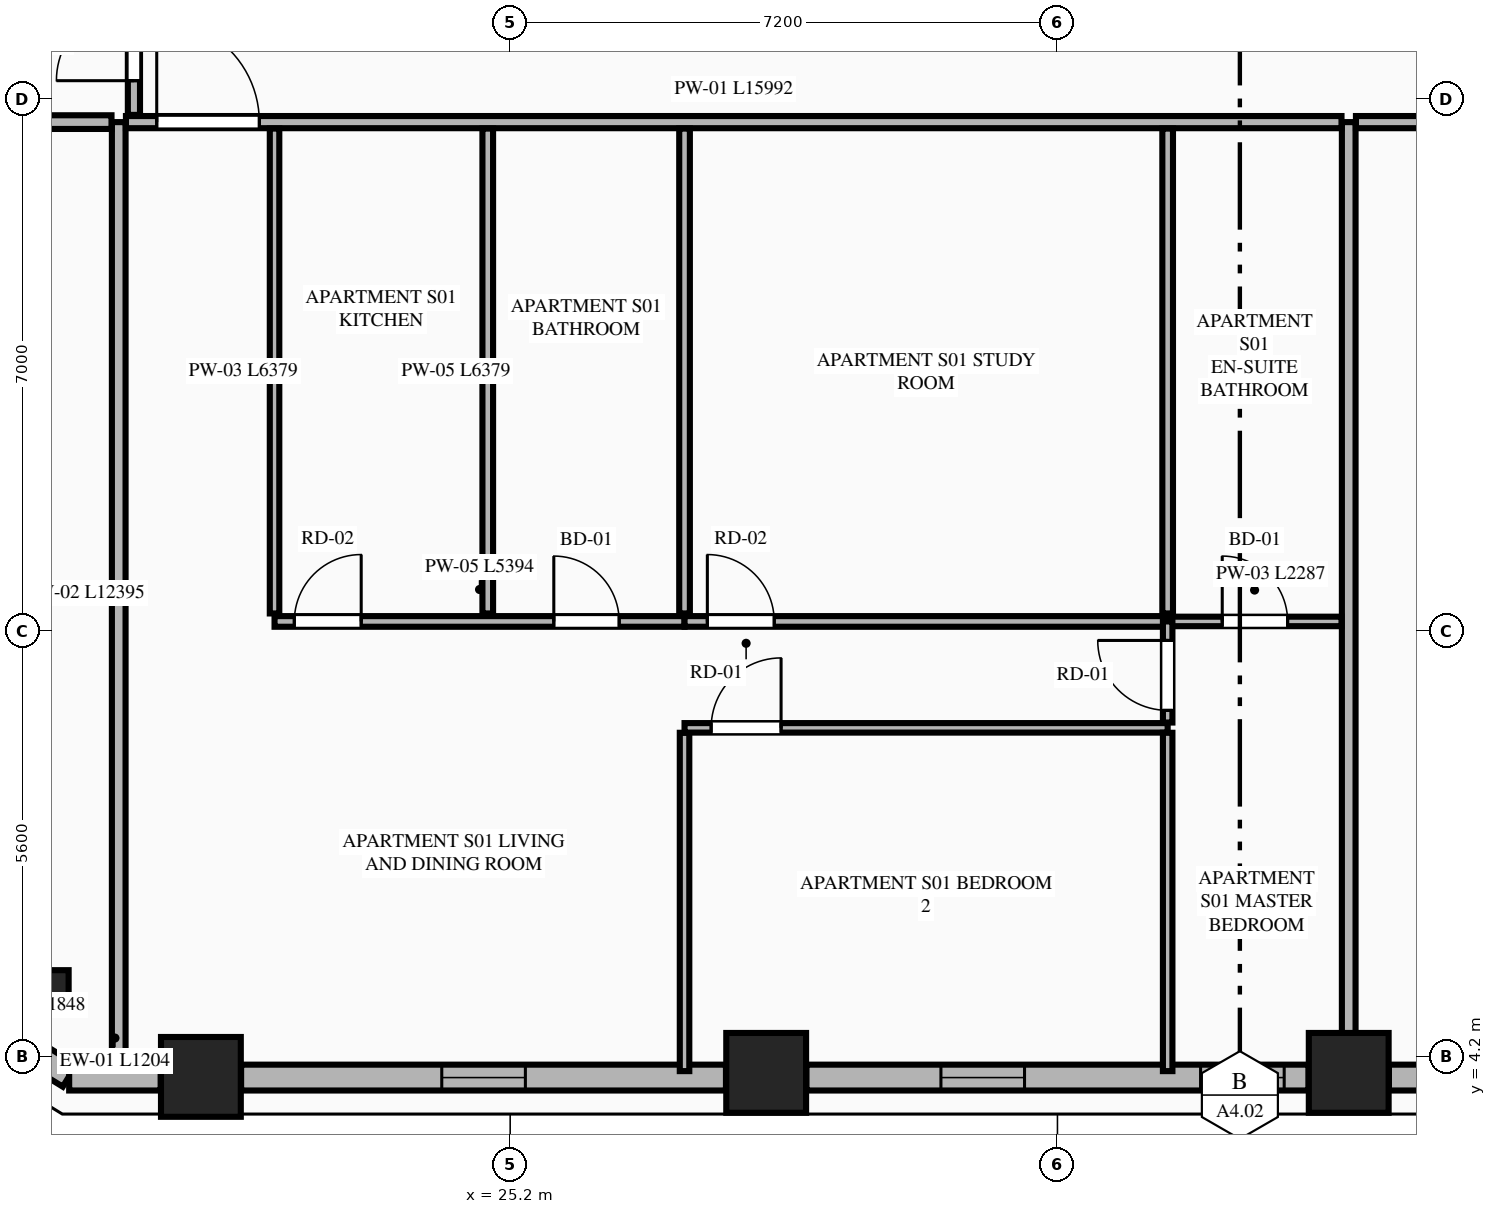
"""IFC4 building model, lengths in metres.
Left out: names, types, materials, properties, quantities, classifications, styles, units other than length and angle.
Written with IfcOpenShell. Run it as: python <this file> out.ifc"""

import sys

from ifc_helpers import new_model, si_unit, direction, frame, frame_2d, origin, origin_2d, place, context, subcontext, project, spatial, rectangle, extrude, element, fill, save


model = new_model("IFC4")
c1 = context("Model", 3, precision=1e-05, world=origin(), true_north=direction((0.0, 1.0)))
c2 = subcontext(c1, "Body", "Model", "MODEL_VIEW")
j1 = project(units=[si_unit("LENGTHUNIT", "METRE"), si_unit("PLANEANGLEUNIT", "RADIAN")], contexts=[c1])
p1 = place(None, origin())
s1 = spatial("IfcSite", under=j1, at=p1, CompositionType="ELEMENT")
p2 = place(p1, origin())
s2 = spatial("IfcBuilding", under=s1, at=p2, CompositionType="ELEMENT")
p3 = place(p2, frame((0.0, 0.0, 105.5)))
s3 = spatial("IfcBuildingStorey", under=s2, at=p3, CompositionType="ELEMENT", Elevation=105.5)
for number, where, z_axis, x_axis in (
    (1, (21.131, 3.939, 0.0), (0.0, 0.0, 1.0), (1.0, 0.0, 0.0)),
    (2, (28.568, 3.992, 0.0), (0.0, 0.0, 1.0), (1.0, 0.0, 0.0)),
    (3, (36.232, 3.992, 0.0), (0.0, 0.0, 1.0), (1.0, 0.0, 0.0)),
):
    element("IfcColumn", number, at=place(p3, frame(where, z_axis=z_axis, x_axis=x_axis)), inside=s3, PredefinedType="COLUMN", context=c2, shape_type="SweptSolid", body=[
        extrude(rectangle(XDim=1.05, YDim=1.05, at=origin_2d()), origin(), (0.0, 0.0, 1.0), 3.55),
    ])
p4 = place(p3, frame((19.141, 5.093, 0.0), z_axis=(0.0, 0.0, 1.0), x_axis=(0.865160173452, -0.501495637342, 0.0)))
e4 = element("IfcColumn", 4, at=p4, inside=s3, PredefinedType="PILASTER", context=c2, shape_type="SweptSolid", body=[
    extrude(rectangle(XDim=0.5, YDim=0.35, at=origin_2d()), origin(), (0.0, 0.0, 1.0), 3.55),
])
p5 = place(p3, frame((17.829, 4.923, 0.0), z_axis=(0.0, 0.0, 1.0), x_axis=(0.851798915137, -0.523868884523, 0.0)))
e5 = element("IfcWall", 5, at=p5, inside=s3, PredefinedType="STANDARD", context=c2, shape_type="SweptSolid", body=[
    extrude(rectangle(XDim=1.848, YDim=0.34, at=frame_2d((0.924, 0.0))), origin(), (0.0, 0.0, 1.0), 3.34),
])
p6 = place(p3, frame((19.398, 3.93, 0.0), z_axis=(0.0, 0.0, 1.0), x_axis=(1.0, 0.0, 0.0)))
e6 = element("IfcWall", 6, at=p6, inside=s3, PredefinedType="STANDARD", context=c2, shape_type="SweptSolid", body=[
    extrude(rectangle(XDim=1.204, YDim=0.34, at=frame_2d((0.602, 0.0))), origin(), (0.0, 0.0, 1.0), 3.34),
])
p7 = place(p3, frame((21.66, 3.93, 0.0), z_axis=(0.0, 0.0, 1.0), x_axis=(1.0, 0.0, 0.0)))
e7 = element("IfcWall", 7, at=p7, inside=s3, PredefinedType="STANDARD", context=c2, shape_type="SweptSolid", body=[
    extrude(rectangle(XDim=6.379, YDim=0.34, at=frame_2d((3.189, 0.0))), origin(), (0.0, 0.0, 1.0), 2.797),
])
p8 = place(p7, frame((2.64, 0.0, 0.75)))
e8 = element("IfcOpeningElement", 8, at=p8, cuts=e7, PredefinedType="OPENING", context=c2, shape_type="SweptSolid", body=[
    extrude(rectangle(XDim=1.1, YDim=1.897, at=frame_2d((0.55, 0.948))), frame((0.0, 0.18, 0.0), z_axis=(0.0, -1.0, 0.0), x_axis=(1.0, 0.0, 0.0)), (0.0, 0.0, 1.0), 0.36),
])
p9 = place(p3, frame((29.097, 3.93, 0.0), z_axis=(0.0, 0.0, 1.0), x_axis=(1.0, 0.0, 0.0)))
e9 = element("IfcWall", 9, at=p9, inside=s3, PredefinedType="STANDARD", context=c2, shape_type="SweptSolid", body=[
    extrude(rectangle(XDim=6.606, YDim=0.34, at=frame_2d((3.303, 0.0))), origin(), (0.0, 0.0, 1.0), 2.797),
])
p10 = place(p9, frame((1.77, 0.0, 0.75)))
e10 = element("IfcOpeningElement", 10, at=p10, cuts=e9, PredefinedType="OPENING", context=c2, shape_type="SweptSolid", body=[
    extrude(rectangle(XDim=1.1, YDim=1.897, at=frame_2d((0.55, 0.948))), frame((0.0, 0.18, 0.0), z_axis=(0.0, -1.0, 0.0), x_axis=(1.0, 0.0, 0.0)), (0.0, 0.0, 1.0), 0.36),
])
p11 = place(p9, frame((5.186, 0.0, 0.75)))
e11 = element("IfcOpeningElement", 11, at=p11, cuts=e9, PredefinedType="OPENING", context=c2, shape_type="SweptSolid", body=[
    extrude(rectangle(XDim=1.1, YDim=1.897, at=frame_2d((0.55, 0.948))), frame((0.0, 0.18, 0.0), z_axis=(0.0, -1.0, 0.0), x_axis=(1.0, 0.0, 0.0)), (0.0, 0.0, 1.0), 0.36),
])
p12 = place(p3, frame((36.761, 3.93, 0.0), z_axis=(0.0, 0.0, 1.0), x_axis=(1.0, 0.0, 0.0)))
e12 = element("IfcWall", 12, at=p12, inside=s3, PredefinedType="STANDARD", context=c2, shape_type="SweptSolid", body=[
    extrude(rectangle(XDim=6.379, YDim=0.34, at=frame_2d((3.189, 0.0))), origin(), (0.0, 0.0, 1.0), 2.797),
])
p13 = place(p12, frame((2.639, 0.0, 0.75)))
e13 = element("IfcOpeningElement", 13, at=p13, cuts=e12, PredefinedType="OPENING", context=c2, shape_type="SweptSolid", body=[
    extrude(rectangle(XDim=1.1, YDim=1.897, at=frame_2d((0.55, 0.948))), frame((0.0, 0.18, 0.0), z_axis=(0.0, -1.0, 0.0), x_axis=(1.0, 0.0, 0.0)), (0.0, 0.0, 1.0), 0.36),
])
p14 = place(p3, frame((20.05, 4.105, 0.0), z_axis=(0.0, 0.0, 1.0), x_axis=(0.0, 1.0, 0.0)))
e14 = element("IfcWall", 14, at=p14, inside=s3, PredefinedType="PARTITIONING", context=c2, shape_type="SweptSolid", body=[
    extrude(rectangle(XDim=12.395, YDim=0.18, at=frame_2d((6.198, 0.0))), origin(), (0.0, 0.0, 1.0), 3.34),
])
p15 = place(p3, frame((36.232, 4.105, 0.0), z_axis=(0.0, 0.0, 1.0), x_axis=(0.0, 1.0, 0.0)))
e15 = element("IfcWall", 15, at=p15, inside=s3, PredefinedType="PARTITIONING", context=c2, shape_type="SweptSolid", body=[
    extrude(rectangle(XDim=12.395, YDim=0.18, at=frame_2d((6.198, 0.0))), origin(), (0.0, 0.0, 1.0), 2.722),
])
p16 = place(p3, frame((20.145, 16.5, 0.0), z_axis=(0.0, 0.0, 1.0), x_axis=(1.0, 0.0, 0.0)))
e16 = element("IfcWall", 16, at=p16, inside=s3, PredefinedType="PARTITIONING", context=c2, shape_type="SweptSolid", body=[
    extrude(rectangle(XDim=15.992, YDim=0.16, at=frame_2d((7.996, 0.0))), origin(), (0.0, 0.0, 1.0), 3.34),
])
p17 = place(p16, frame((0.405, 0.0, 0.0)))
e17 = element("IfcOpeningElement", 17, at=p17, cuts=e16, PredefinedType="OPENING", context=c2, shape_type="SweptSolid", body=[
    extrude(rectangle(XDim=1.35, YDim=2.35, at=frame_2d((0.675, 1.175))), frame((0.0, 0.09, 0.0), z_axis=(0.0, -1.0, 0.0), x_axis=(1.0, 0.0, 0.0)), (0.0, 0.0, 1.0), 0.18),
])
p18 = place(p3, frame((22.1, 10.036, 0.0), z_axis=(0.0, 0.0, 1.0), x_axis=(0.0, 1.0, 0.0)))
e18 = element("IfcWall", 18, at=p18, inside=s3, PredefinedType="PARTITIONING", context=c2, shape_type="SweptSolid", body=[
    extrude(rectangle(XDim=6.379, YDim=0.125, at=frame_2d((3.189, 0.0))), origin(), (0.0, 0.0, 1.0), 2.722),
])
p19 = place(p3, frame((22.1, 9.931, 0.0), z_axis=(0.0, 0.0, 1.0), x_axis=(1.0, 0.0, 0.0)))
e19 = element("IfcWall", 19, at=p19, inside=s3, PredefinedType="PLUMBINGWALL", context=c2, shape_type="SweptSolid", body=[
    extrude(rectangle(XDim=5.394, YDim=0.14, at=frame_2d((2.697, 0.0))), origin(), (0.0, 0.0, 1.0), 3.34),
])
p20 = place(p19, frame((3.674, 0.0, 0.0)))
e20 = element("IfcOpeningElement", 20, at=p20, cuts=e19, PredefinedType="OPENING", context=c2, shape_type="SweptSolid", body=[
    extrude(rectangle(XDim=0.86, YDim=2.1, at=frame_2d((0.43, 1.05))), frame((0.0, 0.08, 0.0), z_axis=(0.0, -1.0, 0.0), x_axis=(1.0, 0.0, 0.0)), (0.0, 0.0, 1.0), 0.16),
])
p21 = place(p19, frame((0.26, 0.0, 0.0)))
e21 = element("IfcOpeningElement", 21, at=p21, cuts=e19, PredefinedType="OPENING", context=c2, shape_type="SweptSolid", body=[
    extrude(rectangle(XDim=0.88, YDim=2.15, at=frame_2d((0.44, 1.075))), frame((0.0, 0.08, 0.0), z_axis=(0.0, -1.0, 0.0), x_axis=(1.0, 0.0, 0.0)), (0.0, 0.0, 1.0), 0.16),
])
p22 = place(p3, frame((27.494, 9.931, 0.0), z_axis=(0.0, 0.0, 1.0), x_axis=(1.0, 0.0, 0.0)))
e22 = element("IfcWall", 22, at=p22, inside=s3, PredefinedType="PLUMBINGWALL", context=c2, shape_type="SweptSolid", body=[
    extrude(rectangle(XDim=6.356, YDim=0.14, at=frame_2d((3.178, 0.0))), origin(), (0.0, 0.0, 1.0), 3.34),
])
p23 = place(p22, frame((0.3, 0.0, 0.0)))
e23 = element("IfcOpeningElement", 23, at=p23, cuts=e22, PredefinedType="OPENING", context=c2, shape_type="SweptSolid", body=[
    extrude(rectangle(XDim=0.88, YDim=2.15, at=frame_2d((0.44, 1.075))), frame((0.0, 0.08, 0.0), z_axis=(0.0, -1.0, 0.0), x_axis=(1.0, 0.0, 0.0)), (0.0, 0.0, 1.0), 0.16),
])
p24 = place(p3, frame((33.85, 9.931, 0.0), z_axis=(0.0, 0.0, 1.0), x_axis=(1.0, 0.0, 0.0)))
e24 = element("IfcWall", 24, at=p24, inside=s3, PredefinedType="PARTITIONING", context=c2, shape_type="SweptSolid", body=[
    extrude(rectangle(XDim=2.287, YDim=0.125, at=frame_2d((1.144, 0.0))), origin(), (0.0, 0.0, 1.0), 3.34),
])
p25 = place(p24, frame((0.718, 0.0, 0.0)))
e25 = element("IfcOpeningElement", 25, at=p25, cuts=e24, PredefinedType="OPENING", context=c2, shape_type="SweptSolid", body=[
    extrude(rectangle(XDim=0.86, YDim=2.1, at=frame_2d((0.43, 1.05))), frame((0.0, 0.073, 0.0), z_axis=(0.0, -1.0, 0.0), x_axis=(1.0, 0.0, 0.0)), (0.0, 0.0, 1.0), 0.145),
])
p26 = place(p3, frame((24.905, 10.036, 0.0), z_axis=(0.0, 0.0, 1.0), x_axis=(0.0, 1.0, 0.0)))
e26 = element("IfcWall", 26, at=p26, inside=s3, PredefinedType="PLUMBINGWALL", context=c2, shape_type="SweptSolid", body=[
    extrude(rectangle(XDim=6.379, YDim=0.14, at=frame_2d((3.189, 0.0))), origin(), (0.0, 0.0, 1.0), 3.34),
])
p27 = place(p3, frame((27.494, 4.015, 0.0), z_axis=(0.0, 0.0, 1.0), x_axis=(0.0, 1.0, 0.0)))
e27 = element("IfcWall", 27, at=p27, inside=s3, PredefinedType="PARTITIONING", context=c2, shape_type="SweptSolid", body=[
    extrude(rectangle(XDim=4.451, YDim=0.125, at=frame_2d((2.226, 0.0))), origin(), (0.0, 0.0, 1.0), 3.34),
])
p28 = place(p3, frame((27.494, 8.531, 0.0), z_axis=(0.0, 0.0, 1.0), x_axis=(1.0, 0.0, 0.0)))
e28 = element("IfcWall", 28, at=p28, inside=s3, PredefinedType="PARTITIONING", context=c2, shape_type="SweptSolid", body=[
    extrude(rectangle(XDim=6.356, YDim=0.125, at=frame_2d((3.178, 0.0))), origin(), (0.0, 0.0, 1.0), 3.34),
])
p29 = place(p28, frame((0.35, 0.0, 0.0)))
e29 = element("IfcOpeningElement", 29, at=p29, cuts=e28, PredefinedType="OPENING", context=c2, shape_type="SweptSolid", body=[
    extrude(rectangle(XDim=0.92, YDim=2.15, at=frame_2d((0.46, 1.075))), frame((0.0, 0.073, 0.0), z_axis=(0.0, -1.0, 0.0), x_axis=(1.0, 0.0, 0.0)), (0.0, 0.0, 1.0), 0.145),
])
p30 = place(p3, frame((33.85, 8.601, 0.0), z_axis=(0.0, 0.0, 1.0), x_axis=(0.0, 1.0, 0.0)))
e30 = element("IfcWall", 30, at=p30, inside=s3, PredefinedType="PARTITIONING", context=c2, shape_type="SweptSolid", body=[
    extrude(rectangle(XDim=1.33, YDim=0.125, at=frame_2d((0.665, 0.0))), origin(), (0.0, 0.0, 1.0), 3.34),
])
p31 = place(p30, frame((0.16, 0.0, 0.0)))
e31 = element("IfcOpeningElement", 31, at=p31, cuts=e30, PredefinedType="OPENING", context=c2, shape_type="SweptSolid", body=[
    extrude(rectangle(XDim=0.92, YDim=2.15, at=frame_2d((0.46, 1.075))), frame((0.0, 0.073, 0.0), z_axis=(0.0, -1.0, 0.0), x_axis=(1.0, 0.0, 0.0)), (0.0, 0.0, 1.0), 0.145),
])
for number, where, z_axis, x_axis in (
    (32, (27.494, 10.036, 0.0), (0.0, 0.0, 1.0), (0.0, 1.0, 0.0)),
    (33, (33.85, 10.036, 0.0), (0.0, 0.0, 1.0), (0.0, 1.0, 0.0)),
):
    element("IfcWall", number, at=place(p3, frame(where, z_axis=z_axis, x_axis=x_axis)), inside=s3, PredefinedType="PLUMBINGWALL", context=c2, shape_type="SweptSolid", body=[
        extrude(rectangle(XDim=6.379, YDim=0.14, at=frame_2d((3.189, 0.0))), origin(), (0.0, 0.0, 1.0), 3.34),
    ])
p32 = place(p3, frame((33.85, 4.015, 0.0), z_axis=(0.0, 0.0, 1.0), x_axis=(0.0, 1.0, 0.0)))
e34 = element("IfcWall", 34, at=p32, inside=s3, PredefinedType="PARTITIONING", context=c2, shape_type="SweptSolid", body=[
    extrude(rectangle(XDim=4.451, YDim=0.125, at=frame_2d((2.226, 0.0))), origin(), (0.0, 0.0, 1.0), 3.34),
])
p33 = place(p3, frame((36.327, 16.5, 0.0), z_axis=(0.0, 0.0, 1.0), x_axis=(1.0, 0.0, 0.0)))
e35 = element("IfcWall", 35, at=p33, inside=s3, PredefinedType="PARTITIONING", context=c2, shape_type="SweptSolid", body=[
    extrude(rectangle(XDim=8.328, YDim=0.16, at=frame_2d((4.164, 0.0))), origin(), (0.0, 0.0, 1.0), 3.34),
])
p34 = place(p33, frame((6.073, 0.0, 0.0)))
e36 = element("IfcOpeningElement", 36, at=p34, cuts=e35, PredefinedType="OPENING", context=c2, shape_type="SweptSolid", body=[
    extrude(rectangle(XDim=1.02, YDim=2.25, at=frame_2d((0.51, 1.125))), frame((0.0, 0.09, 0.0), z_axis=(0.0, -1.0, 0.0), x_axis=(1.0, 0.0, 0.0)), (0.0, 0.0, 1.0), 0.18),
])
p35 = place(p3, frame((12.185, 16.5, 0.0), z_axis=(0.0, 0.0, 1.0), x_axis=(1.0, 0.0, 0.0)))
e37 = element("IfcWall", 37, at=p35, inside=s3, PredefinedType="PARTITIONING", context=c2, shape_type="SweptSolid", body=[
    extrude(rectangle(XDim=7.77, YDim=0.18, at=frame_2d((3.885, 0.0))), origin(), (0.0, 0.0, 1.0), 3.34),
])
p36 = place(p3, frame((20.25, 16.595, 0.0), z_axis=(0.0, 0.0, 1.0), x_axis=(0.0, 1.0, 0.0)))
e38 = element("IfcWall", 38, at=p36, inside=s3, PredefinedType="PARTITIONING", context=c2, shape_type="SweptSolid", body=[
    extrude(rectangle(XDim=18.61, YDim=0.16, at=frame_2d((9.305, 0.0))), origin(), (0.0, 0.0, 1.0), 3.34),
])
p37 = place(p36, frame((0.45, 0.0, 0.0)))
e39 = element("IfcOpeningElement", 39, at=p37, cuts=e38, PredefinedType="OPENING", context=c2, shape_type="SweptSolid", body=[
    extrude(rectangle(XDim=1.02, YDim=2.25, at=frame_2d((0.51, 1.125))), frame((0.0, 0.09, 0.0), z_axis=(0.0, -1.0, 0.0), x_axis=(1.0, 0.0, 0.0)), (0.0, 0.0, 1.0), 0.18),
])
p38 = place(p8, origin())
e40 = element("IfcWindow", 40, at=p38, inside=s3, PartitioningType="SINGLE_PANEL", PredefinedType="WINDOW", context=c2, shape_type="SweptSolid", body=[
    extrude(rectangle(XDim=1.1, YDim=1.897, at=frame_2d((0.55, 0.948))), frame((0.0, 0.03, 0.0), z_axis=(0.0, -1.0, 0.0), x_axis=(1.0, 0.0, 0.0)), (0.0, 0.0, 1.0), 0.06),
])
fill(e8, e40)
p39 = place(p10, origin())
e41 = element("IfcWindow", 41, at=p39, inside=s3, PartitioningType="SINGLE_PANEL", PredefinedType="WINDOW", context=c2, shape_type="SweptSolid", body=[
    extrude(rectangle(XDim=1.1, YDim=1.897, at=frame_2d((0.55, 0.948))), frame((0.0, 0.03, 0.0), z_axis=(0.0, -1.0, 0.0), x_axis=(1.0, 0.0, 0.0)), (0.0, 0.0, 1.0), 0.06),
])
fill(e10, e41)
p40 = place(p20, origin())
e42 = element("IfcDoor", 42, at=p40, inside=s3, OperationType="SINGLE_SWING_LEFT", PredefinedType="DOOR", context=c2, shape_type="SweptSolid", body=[
    extrude(rectangle(XDim=0.86, YDim=2.1, at=frame_2d((0.43, 1.05))), frame((0.0, 0.025, 0.0), z_axis=(0.0, -1.0, 0.0), x_axis=(1.0, 0.0, 0.0)), (0.0, 0.0, 1.0), 0.05),
])
fill(e20, e42)
p41 = place(p25, origin())
e43 = element("IfcDoor", 43, at=p41, inside=s3, OperationType="SINGLE_SWING_LEFT", PredefinedType="DOOR", context=c2, shape_type="SweptSolid", body=[
    extrude(rectangle(XDim=0.86, YDim=2.1, at=frame_2d((0.43, 1.05))), frame((0.0, 0.025, 0.0), z_axis=(0.0, -1.0, 0.0), x_axis=(1.0, 0.0, 0.0)), (0.0, 0.0, 1.0), 0.05),
])
fill(e25, e43)
p42 = place(p17, origin())
e44 = element("IfcDoor", 44, at=p42, inside=s3, OperationType="SINGLE_SWING_LEFT", PredefinedType="DOOR", context=c2, shape_type="SweptSolid", body=[
    extrude(rectangle(XDim=1.35, YDim=2.35, at=frame_2d((0.675, 1.175))), frame((0.0, 0.025, 0.0), z_axis=(0.0, -1.0, 0.0), x_axis=(1.0, 0.0, 0.0)), (0.0, 0.0, 1.0), 0.05),
])
fill(e17, e44)
p43 = place(p21, origin())
e45 = element("IfcDoor", 45, at=p43, inside=s3, OperationType="SINGLE_SWING_RIGHT", PredefinedType="DOOR", context=c2, shape_type="SweptSolid", body=[
    extrude(rectangle(XDim=0.88, YDim=2.15, at=frame_2d((0.44, 1.075))), frame((0.0, 0.025, 0.0), z_axis=(0.0, -1.0, 0.0), x_axis=(1.0, 0.0, 0.0)), (0.0, 0.0, 1.0), 0.05),
])
fill(e21, e45)
p44 = place(p23, origin())
e46 = element("IfcDoor", 46, at=p44, inside=s3, OperationType="SINGLE_SWING_LEFT", PredefinedType="DOOR", context=c2, shape_type="SweptSolid", body=[
    extrude(rectangle(XDim=0.88, YDim=2.15, at=frame_2d((0.44, 1.075))), frame((0.0, 0.025, 0.0), z_axis=(0.0, -1.0, 0.0), x_axis=(1.0, 0.0, 0.0)), (0.0, 0.0, 1.0), 0.05),
])
fill(e23, e46)
p45 = place(p29, origin())
e47 = element("IfcDoor", 47, at=p45, inside=s3, OperationType="SINGLE_SWING_RIGHT", PredefinedType="DOOR", context=c2, shape_type="SweptSolid", body=[
    extrude(rectangle(XDim=0.92, YDim=2.15, at=frame_2d((0.46, 1.075))), frame((0.0, 0.025, 0.0), z_axis=(0.0, -1.0, 0.0), x_axis=(1.0, 0.0, 0.0)), (0.0, 0.0, 1.0), 0.05),
])
fill(e29, e47)
p46 = place(p31, origin())
e48 = element("IfcDoor", 48, at=p46, inside=s3, OperationType="SINGLE_SWING_RIGHT", PredefinedType="DOOR", context=c2, shape_type="SweptSolid", body=[
    extrude(rectangle(XDim=0.92, YDim=2.15, at=frame_2d((0.46, 1.075))), frame((0.0, 0.025, 0.0), z_axis=(0.0, -1.0, 0.0), x_axis=(1.0, 0.0, 0.0)), (0.0, 0.0, 1.0), 0.05),
])
fill(e31, e48)
p47 = place(p37, origin())
e49 = element("IfcDoor", 49, at=p47, inside=s3, OperationType="SINGLE_SWING_LEFT", PredefinedType="DOOR", context=c2, shape_type="SweptSolid", body=[
    extrude(rectangle(XDim=1.02, YDim=2.25, at=frame_2d((0.51, 1.125))), frame((0.0, 0.025, 0.0), z_axis=(0.0, -1.0, 0.0), x_axis=(1.0, 0.0, 0.0)), (0.0, 0.0, 1.0), 0.05),
])
fill(e39, e49)
p48 = place(p11, origin())
e50 = element("IfcWindow", 50, at=p48, inside=s3, PartitioningType="SINGLE_PANEL", PredefinedType="WINDOW", context=c2, shape_type="SweptSolid", body=[
    extrude(rectangle(XDim=1.1, YDim=1.897, at=frame_2d((0.55, 0.948))), frame((0.0, 0.03, 0.0), z_axis=(0.0, -1.0, 0.0), x_axis=(1.0, 0.0, 0.0)), (0.0, 0.0, 1.0), 0.06),
])
fill(e11, e50)
save(model, sys.argv[1])
